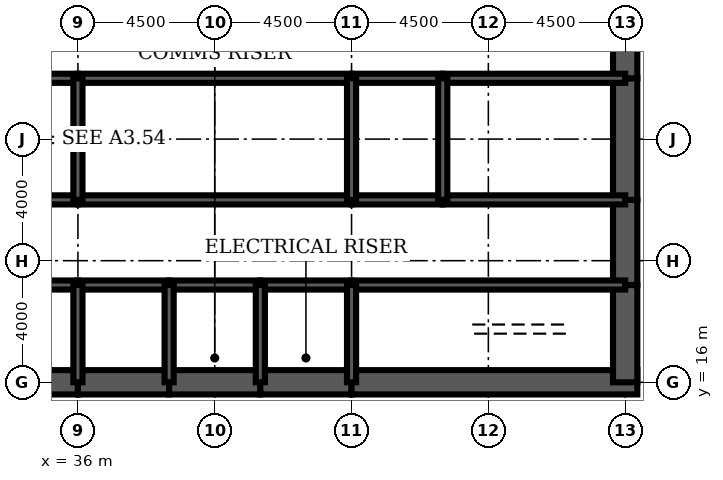
"""IFC4 building model, lengths in metres.
Left out: names, types, materials, properties, quantities, classifications, styles, units other than length and angle.
Written with IfcOpenShell. Run it as: python <this file> out.ifc"""

import sys

from ifc_helpers import new_model, si_unit, direction, frame, frame_2d, origin, place, context, subcontext, project, spatial, rectangle, extrude, element, fill, save


model = new_model("IFC4")
c1 = context("Model", 3, precision=1e-05, world=origin(), true_north=direction((0.0, 1.0)))
c2 = subcontext(c1, "Body", "Model", "MODEL_VIEW")
j1 = project(units=[si_unit("LENGTHUNIT", "METRE"), si_unit("PLANEANGLEUNIT", "RADIAN")], contexts=[c1])
p1 = place(None, origin())
s1 = spatial("IfcSite", under=j1, at=p1, CompositionType="ELEMENT")
p2 = place(p1, origin())
s2 = spatial("IfcBuilding", under=s1, at=p2, CompositionType="ELEMENT")
p3 = place(p2, frame((0.0, 0.0, 232.0)))
s3 = spatial("IfcBuildingStorey", under=s2, at=p3, CompositionType="ELEMENT", Elevation=232.0)
for number, where, z_axis, x_axis in (
    (1, (33.0, 16.0, 0.0), (0.0, 0.0, 1.0), (1.0, 0.0, 0.0)),
    (2, (36.0, 16.0, 0.0), (0.0, 0.0, 1.0), (1.0, 0.0, 0.0)),
    (3, (39.0, 16.0, 0.0), (0.0, 0.0, 1.0), (1.0, 0.0, 0.0)),
    (4, (42.0, 16.0, 0.0), (0.0, 0.0, 1.0), (1.0, 0.0, 0.0)),
):
    element("IfcWall", number, at=place(p3, frame(where, z_axis=z_axis, x_axis=x_axis)), inside=s3, PredefinedType="SHEAR", context=c2, shape_type="SweptSolid", body=[
        extrude(rectangle(XDim=3.0, YDim=0.8, at=frame_2d((1.5, 0.0))), origin(), (0.0, 0.0, 1.0), 4.2),
    ])
p4 = place(p3, frame((45.0, 16.0, 0.0), z_axis=(0.0, 0.0, 1.0), x_axis=(1.0, 0.0, 0.0)))
e5 = element("IfcWall", 5, at=p4, inside=s3, PredefinedType="SHEAR", context=c2, shape_type="SweptSolid", body=[
    extrude(rectangle(XDim=9.4, YDim=0.8, at=frame_2d((4.7, 0.0))), origin(), (0.0, 0.0, 1.0), 4.2),
])
p5 = place(p3, frame((54.0, 16.0, 0.0), z_axis=(0.0, 0.0, 1.0), x_axis=(0.0, 1.0, 0.0)))
e6 = element("IfcWall", 6, at=p5, inside=s3, PredefinedType="SHEAR", context=c2, shape_type="SweptSolid", body=[
    extrude(rectangle(XDim=3.2, YDim=0.8, at=frame_2d((1.6, 0.0))), origin(), (0.0, 0.0, 1.0), 4.2),
])
p6 = place(p3, frame((54.0, 19.2, 0.0), z_axis=(0.0, 0.0, 1.0), x_axis=(0.0, 1.0, 0.0)))
e7 = element("IfcWall", 7, at=p6, inside=s3, PredefinedType="SHEAR", context=c2, shape_type="SweptSolid", body=[
    extrude(rectangle(XDim=2.8, YDim=0.8, at=frame_2d((1.4, 0.0))), origin(), (0.0, 0.0, 1.0), 4.2),
])
p7 = place(p6, frame((0.4, 0.0, 0.0)))
e8 = element("IfcOpeningElement", 8, at=p7, cuts=e7, PredefinedType="OPENING", context=c2, shape_type="SweptSolid", body=[
    extrude(rectangle(XDim=1.8, YDim=2.1, at=frame_2d((0.9, 1.05))), frame((0.0, 0.41, 0.0), z_axis=(0.0, -1.0, 0.0), x_axis=(1.0, 0.0, 0.0)), (0.0, 0.0, 1.0), 0.82),
])
p8 = place(p3, frame((54.0, 22.0, 0.0), z_axis=(0.0, 0.0, 1.0), x_axis=(0.0, 1.0, 0.0)))
e9 = element("IfcWall", 9, at=p8, inside=s3, PredefinedType="SHEAR", context=c2, shape_type="SweptSolid", body=[
    extrude(rectangle(XDim=4.0, YDim=0.8, at=frame_2d((2.0, 0.0))), origin(), (0.0, 0.0, 1.0), 4.2),
])
p9 = place(p3, frame((54.0, 26.0, 0.0), z_axis=(0.0, 0.0, 1.0), x_axis=(0.0, 1.0, 0.0)))
e10 = element("IfcWall", 10, at=p9, inside=s3, PredefinedType="SHEAR", context=c2, shape_type="SweptSolid", body=[
    extrude(rectangle(XDim=2.8, YDim=0.8, at=frame_2d((1.4, 0.0))), origin(), (0.0, 0.0, 1.0), 4.2),
])
p10 = place(p9, frame((0.6, 0.0, 0.0)))
e11 = element("IfcOpeningElement", 11, at=p10, cuts=e10, PredefinedType="OPENING", context=c2, shape_type="SweptSolid", body=[
    extrude(rectangle(XDim=1.8, YDim=2.1, at=frame_2d((0.9, 1.05))), frame((0.0, 0.41, 0.0), z_axis=(0.0, -1.0, 0.0), x_axis=(1.0, 0.0, 0.0)), (0.0, 0.0, 1.0), 0.82),
])
p11 = place(p3, frame((33.0, 19.2, 0.0), z_axis=(0.0, 0.0, 1.0), x_axis=(1.0, 0.0, 0.0)))
e12 = element("IfcWall", 12, at=p11, inside=s3, PredefinedType="SOLIDWALL", context=c2, shape_type="SweptSolid", body=[
    extrude(rectangle(XDim=3.0, YDim=0.3, at=frame_2d((1.5, 0.0))), origin(), (0.0, 0.0, 1.0), 4.2),
])
p12 = place(p11, frame((0.95, 0.0, 0.0)))
e13 = element("IfcOpeningElement", 13, at=p12, cuts=e12, PredefinedType="OPENING", context=c2, shape_type="SweptSolid", body=[
    extrude(rectangle(XDim=1.1, YDim=2.2, at=frame_2d((0.55, 1.1))), frame((0.0, 0.16, 0.0), z_axis=(0.0, -1.0, 0.0), x_axis=(1.0, 0.0, 0.0)), (0.0, 0.0, 1.0), 0.32),
])
p13 = place(p3, frame((36.0, 19.2, 0.0), z_axis=(0.0, 0.0, 1.0), x_axis=(1.0, 0.0, 0.0)))
e14 = element("IfcWall", 14, at=p13, inside=s3, PredefinedType="SOLIDWALL", context=c2, shape_type="SweptSolid", body=[
    extrude(rectangle(XDim=3.0, YDim=0.3, at=frame_2d((1.5, 0.0))), origin(), (0.0, 0.0, 1.0), 4.2),
])
p14 = place(p13, frame((0.95, 0.0, 0.0)))
e15 = element("IfcOpeningElement", 15, at=p14, cuts=e14, PredefinedType="OPENING", context=c2, shape_type="SweptSolid", body=[
    extrude(rectangle(XDim=1.1, YDim=2.2, at=frame_2d((0.55, 1.1))), frame((0.0, 0.16, 0.0), z_axis=(0.0, -1.0, 0.0), x_axis=(1.0, 0.0, 0.0)), (0.0, 0.0, 1.0), 0.32),
])
p15 = place(p3, frame((39.0, 19.2, 0.0), z_axis=(0.0, 0.0, 1.0), x_axis=(1.0, 0.0, 0.0)))
e16 = element("IfcWall", 16, at=p15, inside=s3, PredefinedType="SOLIDWALL", context=c2, shape_type="SweptSolid", body=[
    extrude(rectangle(XDim=3.0, YDim=0.3, at=frame_2d((1.5, 0.0))), origin(), (0.0, 0.0, 1.0), 4.2),
])
p16 = place(p15, frame((1.0, 0.0, 0.0)))
e17 = element("IfcOpeningElement", 17, at=p16, cuts=e16, PredefinedType="OPENING", context=c2, shape_type="SweptSolid", body=[
    extrude(rectangle(XDim=1.0, YDim=2.1, at=frame_2d((0.5, 1.05))), frame((0.0, 0.16, 0.0), z_axis=(0.0, -1.0, 0.0), x_axis=(1.0, 0.0, 0.0)), (0.0, 0.0, 1.0), 0.32),
])
p17 = place(p3, frame((42.0, 19.2, 0.0), z_axis=(0.0, 0.0, 1.0), x_axis=(1.0, 0.0, 0.0)))
e18 = element("IfcWall", 18, at=p17, inside=s3, PredefinedType="SOLIDWALL", context=c2, shape_type="SweptSolid", body=[
    extrude(rectangle(XDim=3.0, YDim=0.3, at=frame_2d((1.5, 0.0))), origin(), (0.0, 0.0, 1.0), 4.2),
])
p18 = place(p17, frame((1.0, 0.0, 0.0)))
e19 = element("IfcOpeningElement", 19, at=p18, cuts=e18, PredefinedType="OPENING", context=c2, shape_type="SweptSolid", body=[
    extrude(rectangle(XDim=1.0, YDim=2.1, at=frame_2d((0.5, 1.05))), frame((0.0, 0.16, 0.0), z_axis=(0.0, -1.0, 0.0), x_axis=(1.0, 0.0, 0.0)), (0.0, 0.0, 1.0), 0.32),
])
p19 = place(p3, frame((45.0, 19.2, 0.0), z_axis=(0.0, 0.0, 1.0), x_axis=(1.0, 0.0, 0.0)))
e20 = element("IfcWall", 20, at=p19, inside=s3, PredefinedType="SOLIDWALL", context=c2, shape_type="SweptSolid", body=[
    extrude(rectangle(XDim=9.0, YDim=0.3, at=frame_2d((4.5, 0.0))), origin(), (0.0, 0.0, 1.0), 4.2),
])
p20 = place(p19, frame((7.35, 0.0, 0.0)))
e21 = element("IfcOpeningElement", 21, at=p20, cuts=e20, PredefinedType="OPENING", context=c2, shape_type="SweptSolid", body=[
    extrude(rectangle(XDim=1.0, YDim=2.1, at=frame_2d((0.5, 1.05))), frame((0.0, 0.16, 0.0), z_axis=(0.0, -1.0, 0.0), x_axis=(1.0, 0.0, 0.0)), (0.0, 0.0, 1.0), 0.32),
])
p21 = place(p3, frame((27.0, 22.0, 0.0), z_axis=(0.0, 0.0, 1.0), x_axis=(1.0, 0.0, 0.0)))
e22 = element("IfcWall", 22, at=p21, inside=s3, PredefinedType="SOLIDWALL", context=c2, shape_type="SweptSolid", body=[
    extrude(rectangle(XDim=9.0, YDim=0.3, at=frame_2d((4.5, 0.0))), origin(), (0.0, 0.0, 1.0), 4.2),
])
p22 = place(p21, frame((4.0, 0.0, 0.0)))
e23 = element("IfcOpeningElement", 23, at=p22, cuts=e22, PredefinedType="OPENING", context=c2, shape_type="SweptSolid", body=[
    extrude(rectangle(XDim=1.0, YDim=2.1, at=frame_2d((0.5, 1.05))), frame((0.0, 0.16, 0.0), z_axis=(0.0, -1.0, 0.0), x_axis=(1.0, 0.0, 0.0)), (0.0, 0.0, 1.0), 0.32),
])
p23 = place(p3, frame((36.0, 22.0, 0.0), z_axis=(0.0, 0.0, 1.0), x_axis=(1.0, 0.0, 0.0)))
e24 = element("IfcWall", 24, at=p23, inside=s3, PredefinedType="SOLIDWALL", context=c2, shape_type="SweptSolid", body=[
    extrude(rectangle(XDim=9.0, YDim=0.3, at=frame_2d((4.5, 0.0))), origin(), (0.0, 0.0, 1.0), 4.2),
])
p24 = place(p23, frame((4.0, 0.0, 0.0)))
e25 = element("IfcOpeningElement", 25, at=p24, cuts=e24, PredefinedType="OPENING", context=c2, shape_type="SweptSolid", body=[
    extrude(rectangle(XDim=1.0, YDim=2.1, at=frame_2d((0.5, 1.05))), frame((0.0, 0.16, 0.0), z_axis=(0.0, -1.0, 0.0), x_axis=(1.0, 0.0, 0.0)), (0.0, 0.0, 1.0), 0.32),
])
p25 = place(p3, frame((45.0, 22.0, 0.0), z_axis=(0.0, 0.0, 1.0), x_axis=(1.0, 0.0, 0.0)))
e26 = element("IfcWall", 26, at=p25, inside=s3, PredefinedType="SOLIDWALL", context=c2, shape_type="SweptSolid", body=[
    extrude(rectangle(XDim=3.0, YDim=0.3, at=frame_2d((1.5, 0.0))), origin(), (0.0, 0.0, 1.0), 4.2),
])
p26 = place(p25, frame((1.0, 0.0, 0.0)))
e27 = element("IfcOpeningElement", 27, at=p26, cuts=e26, PredefinedType="OPENING", context=c2, shape_type="SweptSolid", body=[
    extrude(rectangle(XDim=1.0, YDim=2.1, at=frame_2d((0.5, 1.05))), frame((0.0, 0.16, 0.0), z_axis=(0.0, -1.0, 0.0), x_axis=(1.0, 0.0, 0.0)), (0.0, 0.0, 1.0), 0.32),
])
p27 = place(p3, frame((48.0, 22.0, 0.0), z_axis=(0.0, 0.0, 1.0), x_axis=(1.0, 0.0, 0.0)))
e28 = element("IfcWall", 28, at=p27, inside=s3, PredefinedType="SOLIDWALL", context=c2, shape_type="SweptSolid", body=[
    extrude(rectangle(XDim=6.0, YDim=0.3, at=frame_2d((3.0, 0.0))), origin(), (0.0, 0.0, 1.0), 4.2),
])
p28 = place(p27, frame((2.0, 0.0, 0.0)))
e29 = element("IfcOpeningElement", 29, at=p28, cuts=e28, PredefinedType="OPENING", context=c2, shape_type="SweptSolid", body=[
    extrude(rectangle(XDim=1.0, YDim=2.1, at=frame_2d((0.5, 1.05))), frame((0.0, 0.16, 0.0), z_axis=(0.0, -1.0, 0.0), x_axis=(1.0, 0.0, 0.0)), (0.0, 0.0, 1.0), 0.32),
])
p29 = place(p27, frame((4.2, 0.0, 0.0)))
e30 = element("IfcOpeningElement", 30, at=p29, cuts=e28, PredefinedType="OPENING", context=c2, shape_type="SweptSolid", body=[
    extrude(rectangle(XDim=1.0, YDim=2.1, at=frame_2d((0.5, 1.05))), frame((0.0, 0.16, 0.0), z_axis=(0.0, -1.0, 0.0), x_axis=(1.0, 0.0, 0.0)), (0.0, 0.0, 1.0), 0.32),
])
for number, where, z_axis, x_axis in (
    (31, (27.0, 26.0, 0.0), (0.0, 0.0, 1.0), (1.0, 0.0, 0.0)),
    (32, (36.0, 26.0, 0.0), (0.0, 0.0, 1.0), (1.0, 0.0, 0.0)),
):
    element("IfcWall", number, at=place(p3, frame(where, z_axis=z_axis, x_axis=x_axis)), inside=s3, PredefinedType="SOLIDWALL", context=c2, shape_type="SweptSolid", body=[
        extrude(rectangle(XDim=9.0, YDim=0.3, at=frame_2d((4.5, 0.0))), origin(), (0.0, 0.0, 1.0), 4.2),
    ])
p30 = place(p3, frame((45.0, 26.0, 0.0), z_axis=(0.0, 0.0, 1.0), x_axis=(1.0, 0.0, 0.0)))
e33 = element("IfcWall", 33, at=p30, inside=s3, PredefinedType="SOLIDWALL", context=c2, shape_type="SweptSolid", body=[
    extrude(rectangle(XDim=3.0, YDim=0.3, at=frame_2d((1.5, 0.0))), origin(), (0.0, 0.0, 1.0), 4.2),
])
p31 = place(p3, frame((48.0, 26.0, 0.0), z_axis=(0.0, 0.0, 1.0), x_axis=(1.0, 0.0, 0.0)))
e34 = element("IfcWall", 34, at=p31, inside=s3, PredefinedType="SOLIDWALL", context=c2, shape_type="SweptSolid", body=[
    extrude(rectangle(XDim=6.0, YDim=0.3, at=frame_2d((3.0, 0.0))), origin(), (0.0, 0.0, 1.0), 4.2),
])
for number, where, z_axis, x_axis in (
    (35, (36.0, 16.0, 0.0), (0.0, 0.0, 1.0), (0.0, 1.0, 0.0)),
    (36, (39.0, 16.0, 0.0), (0.0, 0.0, 1.0), (0.0, 1.0, 0.0)),
    (37, (42.0, 16.0, 0.0), (0.0, 0.0, 1.0), (0.0, 1.0, 0.0)),
    (38, (45.0, 16.0, 0.0), (0.0, 0.0, 1.0), (0.0, 1.0, 0.0)),
):
    element("IfcWall", number, at=place(p3, frame(where, z_axis=z_axis, x_axis=x_axis)), inside=s3, PredefinedType="SOLIDWALL", context=c2, shape_type="SweptSolid", body=[
        extrude(rectangle(XDim=3.2, YDim=0.3, at=frame_2d((1.6, 0.0))), origin(), (0.0, 0.0, 1.0), 4.2),
    ])
for number, where, z_axis, x_axis in (
    (39, (36.0, 22.0, 0.0), (0.0, 0.0, 1.0), (0.0, 1.0, 0.0)),
    (40, (45.0, 22.0, 0.0), (0.0, 0.0, 1.0), (0.0, 1.0, 0.0)),
    (41, (48.0, 22.0, 0.0), (0.0, 0.0, 1.0), (0.0, 1.0, 0.0)),
):
    element("IfcWall", number, at=place(p3, frame(where, z_axis=z_axis, x_axis=x_axis)), inside=s3, PredefinedType="SOLIDWALL", context=c2, shape_type="SweptSolid", body=[
        extrude(rectangle(XDim=4.0, YDim=0.3, at=frame_2d((2.0, 0.0))), origin(), (0.0, 0.0, 1.0), 4.2),
    ])
p32 = place(p3, frame((39.15, 17.35, 0.0), z_axis=(0.0, 0.0, 1.0), x_axis=(1.0, 0.0, 0.0)))
e42 = element("IfcWall", 42, at=p32, inside=s3, PredefinedType="SOLIDWALL", context=c2, shape_type="SweptSolid", body=[
    extrude(rectangle(XDim=2.7, YDim=0.3, at=frame_2d((1.35, 0.0))), origin(), (0.0, 0.0, 1.0), 4.04),
])
p33 = place(p32, frame((0.85, 0.0, 0.0)))
e43 = element("IfcOpeningElement", 43, at=p33, cuts=e42, PredefinedType="OPENING", context=c2, shape_type="SweptSolid", body=[
    extrude(rectangle(XDim=1.0, YDim=2.1, at=frame_2d((0.5, 1.05))), frame((0.0, 0.16, 0.0), z_axis=(0.0, -1.0, 0.0), x_axis=(1.0, 0.0, 0.0)), (0.0, 0.0, 1.0), 0.32),
])
p34 = place(p3, frame((42.15, 17.35, 0.0), z_axis=(0.0, 0.0, 1.0), x_axis=(1.0, 0.0, 0.0)))
e44 = element("IfcWall", 44, at=p34, inside=s3, PredefinedType="SOLIDWALL", context=c2, shape_type="SweptSolid", body=[
    extrude(rectangle(XDim=2.7, YDim=0.3, at=frame_2d((1.35, 0.0))), origin(), (0.0, 0.0, 1.0), 4.04),
])
p35 = place(p34, frame((0.85, 0.0, 0.0)))
e45 = element("IfcOpeningElement", 45, at=p35, cuts=e44, PredefinedType="OPENING", context=c2, shape_type="SweptSolid", body=[
    extrude(rectangle(XDim=1.0, YDim=2.1, at=frame_2d((0.5, 1.05))), frame((0.0, 0.16, 0.0), z_axis=(0.0, -1.0, 0.0), x_axis=(1.0, 0.0, 0.0)), (0.0, 0.0, 1.0), 0.32),
])
p36 = place(p3, frame((38.0, 22.15, 0.0), z_axis=(0.0, 0.0, 1.0), x_axis=(0.0, 1.0, 0.0)))
e46 = element("IfcWall", 46, at=p36, inside=s3, PredefinedType="PARTITIONING", context=c2, shape_type="SweptSolid", body=[
    extrude(rectangle(XDim=3.7, YDim=0.15, at=frame_2d((1.85, 0.0))), origin(), (0.0, 0.0, 1.0), 3.0),
])
p37 = place(p36, frame((2.2, 0.0, 0.0)))
e47 = element("IfcOpeningElement", 47, at=p37, cuts=e46, PredefinedType="OPENING", context=c2, shape_type="SweptSolid", body=[
    extrude(rectangle(XDim=1.0, YDim=2.1, at=frame_2d((0.5, 1.05))), frame((0.0, 0.085, 0.0), z_axis=(0.0, -1.0, 0.0), x_axis=(1.0, 0.0, 0.0)), (0.0, 0.0, 1.0), 0.17),
])
p38 = place(p3, frame((51.725, 22.15, 0.0), z_axis=(0.0, 0.0, 1.0), x_axis=(0.0, 1.0, 0.0)))
e48 = element("IfcWall", 48, at=p38, inside=s3, PredefinedType="PARTITIONING", context=c2, shape_type="SweptSolid", body=[
    extrude(rectangle(XDim=3.7, YDim=0.15, at=frame_2d((1.85, 0.0))), origin(), (0.0, 0.0, 1.0), 3.0),
])
p39 = place(p3, frame((48.6, 19.35, 0.0), z_axis=(0.0, 0.0, 1.0), x_axis=(0.0, 1.0, 0.0)))
e49 = element("IfcWall", 49, at=p39, inside=s3, PredefinedType="PARTITIONING", context=c2, shape_type="SweptSolid", body=[
    extrude(rectangle(XDim=2.5, YDim=0.15, at=frame_2d((1.25, 0.0))), origin(), (0.0, 0.0, 1.0), 3.0),
])
p40 = place(p39, frame((1.15, 0.0, 0.0)))
e50 = element("IfcOpeningElement", 50, at=p40, cuts=e49, PredefinedType="OPENING", context=c2, shape_type="SweptSolid", body=[
    extrude(rectangle(XDim=1.0, YDim=2.1, at=frame_2d((0.5, 1.05))), frame((0.0, 0.085, 0.0), z_axis=(0.0, -1.0, 0.0), x_axis=(1.0, 0.0, 0.0)), (0.0, 0.0, 1.0), 0.17),
])
p41 = place(p33, origin())
e51 = element("IfcDoor", 51, at=p41, inside=s3, OperationType="SINGLE_SWING_LEFT", PredefinedType="DOOR", context=c2, shape_type="SweptSolid", body=[
    extrude(rectangle(XDim=1.0, YDim=2.1, at=frame_2d((0.5, 1.05))), frame((0.0, 0.025, 0.0), z_axis=(0.0, -1.0, 0.0), x_axis=(1.0, 0.0, 0.0)), (0.0, 0.0, 1.0), 0.05),
])
fill(e43, e51)
p42 = place(p35, origin())
e52 = element("IfcDoor", 52, at=p42, inside=s3, OperationType="SINGLE_SWING_LEFT", PredefinedType="DOOR", context=c2, shape_type="SweptSolid", body=[
    extrude(rectangle(XDim=1.0, YDim=2.1, at=frame_2d((0.5, 1.05))), frame((0.0, 0.025, 0.0), z_axis=(0.0, -1.0, 0.0), x_axis=(1.0, 0.0, 0.0)), (0.0, 0.0, 1.0), 0.05),
])
fill(e45, e52)
p43 = place(p37, origin())
e53 = element("IfcDoor", 53, at=p43, inside=s3, OperationType="SINGLE_SWING_RIGHT", PredefinedType="DOOR", context=c2, shape_type="SweptSolid", body=[
    extrude(rectangle(XDim=1.0, YDim=2.1, at=frame_2d((0.5, 1.05))), frame((0.0, 0.025, 0.0), z_axis=(0.0, -1.0, 0.0), x_axis=(1.0, 0.0, 0.0)), (0.0, 0.0, 1.0), 0.05),
])
fill(e47, e53)
p44 = place(p40, origin())
e54 = element("IfcDoor", 54, at=p44, inside=s3, OperationType="SINGLE_SWING_RIGHT", PredefinedType="DOOR", context=c2, shape_type="SweptSolid", body=[
    extrude(rectangle(XDim=1.0, YDim=2.1, at=frame_2d((0.5, 1.05))), frame((0.0, 0.025, 0.0), z_axis=(0.0, -1.0, 0.0), x_axis=(1.0, 0.0, 0.0)), (0.0, 0.0, 1.0), 0.05),
])
fill(e50, e54)
p45 = place(p14, origin())
e55 = element("IfcDoor", 55, at=p45, inside=s3, OperationType="DOUBLE_DOOR_SLIDING", PredefinedType="USERDEFINED", context=c2, shape_type="SweptSolid", body=[
    extrude(rectangle(XDim=1.1, YDim=2.2, at=frame_2d((0.55, 1.1))), frame((0.0, 0.025, 0.0), z_axis=(0.0, -1.0, 0.0), x_axis=(1.0, 0.0, 0.0)), (0.0, 0.0, 1.0), 0.05),
])
fill(e15, e55)
p46 = place(p20, origin())
e56 = element("IfcDoor", 56, at=p46, inside=s3, OperationType="SINGLE_SWING_RIGHT", PredefinedType="DOOR", context=c2, shape_type="SweptSolid", body=[
    extrude(rectangle(XDim=1.0, YDim=2.1, at=frame_2d((0.5, 1.05))), frame((0.0, 0.025, 0.0), z_axis=(0.0, -1.0, 0.0), x_axis=(1.0, 0.0, 0.0)), (0.0, 0.0, 1.0), 0.05),
])
fill(e21, e56)
p47 = place(p7, origin())
e57 = element("IfcDoor", 57, at=p47, inside=s3, OperationType="SINGLE_SWING_LEFT", PredefinedType="DOOR", context=c2, shape_type="SweptSolid", body=[
    extrude(rectangle(XDim=1.8, YDim=2.1, at=frame_2d((0.9, 1.05))), frame((0.0, 0.4, 0.0), z_axis=(0.0, -1.0, 0.0), x_axis=(1.0, 0.0, 0.0)), (0.0, 0.0, 1.0), 0.8),
])
fill(e8, e57)
p48 = place(p10, origin())
e58 = element("IfcDoor", 58, at=p48, inside=s3, OperationType="SINGLE_SWING_LEFT", PredefinedType="DOOR", context=c2, shape_type="SweptSolid", body=[
    extrude(rectangle(XDim=1.8, YDim=2.1, at=frame_2d((0.9, 1.05))), frame((0.0, 0.4, 0.0), z_axis=(0.0, -1.0, 0.0), x_axis=(1.0, 0.0, 0.0)), (0.0, 0.0, 1.0), 0.8),
])
fill(e11, e58)
p49 = place(p24, origin())
e59 = element("IfcDoor", 59, at=p49, inside=s3, OperationType="SINGLE_SWING_LEFT", PredefinedType="DOOR", context=c2, shape_type="SweptSolid", body=[
    extrude(rectangle(XDim=1.0, YDim=2.1, at=frame_2d((0.5, 1.05))), frame((0.0, 0.025, 0.0), z_axis=(0.0, -1.0, 0.0), x_axis=(1.0, 0.0, 0.0)), (0.0, 0.0, 1.0), 0.05),
])
fill(e25, e59)
p50 = place(p26, origin())
e60 = element("IfcDoor", 60, at=p50, inside=s3, OperationType="SINGLE_SWING_LEFT", PredefinedType="DOOR", context=c2, shape_type="SweptSolid", body=[
    extrude(rectangle(XDim=1.0, YDim=2.1, at=frame_2d((0.5, 1.05))), frame((0.0, 0.025, 0.0), z_axis=(0.0, -1.0, 0.0), x_axis=(1.0, 0.0, 0.0)), (0.0, 0.0, 1.0), 0.05),
])
fill(e27, e60)
p51 = place(p28, origin())
e61 = element("IfcDoor", 61, at=p51, inside=s3, OperationType="SINGLE_SWING_LEFT", PredefinedType="DOOR", context=c2, shape_type="SweptSolid", body=[
    extrude(rectangle(XDim=1.0, YDim=2.1, at=frame_2d((0.5, 1.05))), frame((0.0, 0.025, 0.0), z_axis=(0.0, -1.0, 0.0), x_axis=(1.0, 0.0, 0.0)), (0.0, 0.0, 1.0), 0.05),
])
fill(e29, e61)
p52 = place(p29, origin())
e62 = element("IfcDoor", 62, at=p52, inside=s3, OperationType="SINGLE_SWING_RIGHT", PredefinedType="DOOR", context=c2, shape_type="SweptSolid", body=[
    extrude(rectangle(XDim=1.0, YDim=2.1, at=frame_2d((0.5, 1.05))), frame((0.0, 0.025, 0.0), z_axis=(0.0, -1.0, 0.0), x_axis=(1.0, 0.0, 0.0)), (0.0, 0.0, 1.0), 0.05),
])
fill(e30, e62)
p53 = place(p16, origin())
e63 = element("IfcDoor", 63, at=p53, inside=s3, OperationType="SINGLE_SWING_LEFT", PredefinedType="DOOR", context=c2, shape_type="SweptSolid", body=[
    extrude(rectangle(XDim=1.0, YDim=2.1, at=frame_2d((0.5, 1.05))), frame((0.0, 0.025, 0.0), z_axis=(0.0, -1.0, 0.0), x_axis=(1.0, 0.0, 0.0)), (0.0, 0.0, 1.0), 0.05),
])
fill(e17, e63)
p54 = place(p18, origin())
e64 = element("IfcDoor", 64, at=p54, inside=s3, OperationType="SINGLE_SWING_LEFT", PredefinedType="DOOR", context=c2, shape_type="SweptSolid", body=[
    extrude(rectangle(XDim=1.0, YDim=2.1, at=frame_2d((0.5, 1.05))), frame((0.0, 0.025, 0.0), z_axis=(0.0, -1.0, 0.0), x_axis=(1.0, 0.0, 0.0)), (0.0, 0.0, 1.0), 0.05),
])
fill(e19, e64)
save(model, sys.argv[1])
